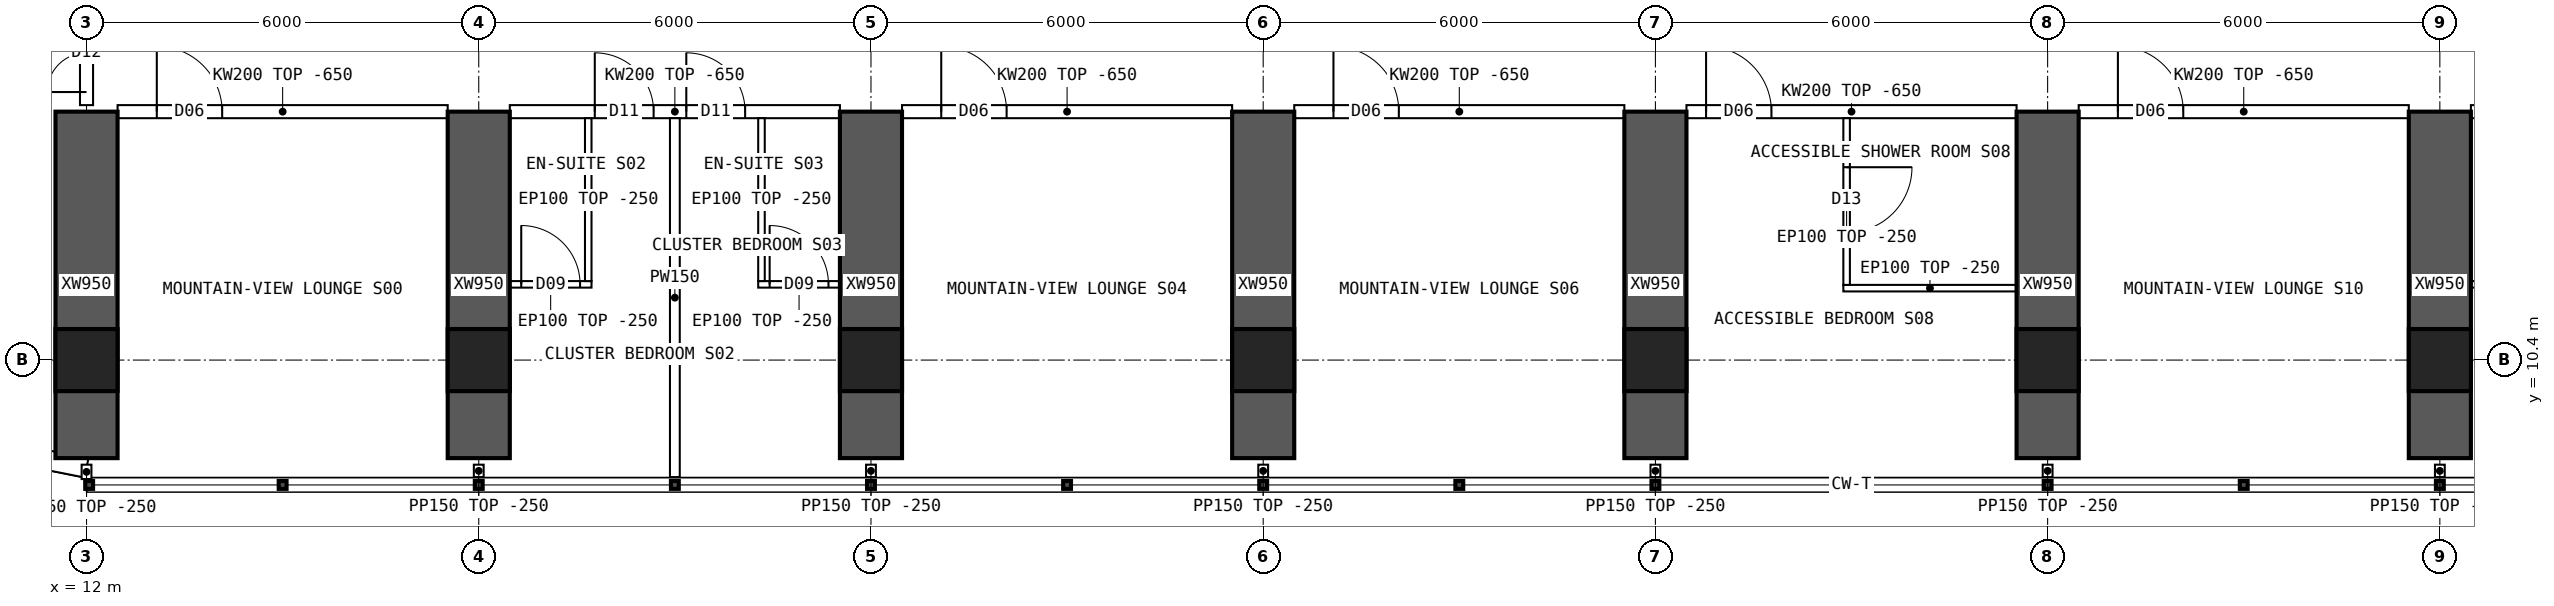
"""IFC4 building model, lengths in metres.
Left out: names, types, materials, properties, quantities, classifications, styles, units other than length and angle.
Written with IfcOpenShell. Run it as: python <this file> out.ifc"""

import sys

from ifc_helpers import new_model, si_unit, direction, frame, frame_2d, origin, origin_2d, place, context, subcontext, project, spatial, polyline, rectangle, hollow_rectangle, outline, extrude, element, fill, save


model = new_model("IFC4")
c1 = context("Model", 3, precision=1e-05, world=origin(), true_north=direction((0.0, 1.0)))
c2 = subcontext(c1, "Body", "Model", "MODEL_VIEW")
j1 = project(units=[si_unit("LENGTHUNIT", "METRE"), si_unit("PLANEANGLEUNIT", "RADIAN")], contexts=[c1])
p1 = place(None, origin())
s1 = spatial("IfcSite", under=j1, at=p1, CompositionType="ELEMENT")
p2 = place(p1, origin())
s2 = spatial("IfcBuilding", under=s1, at=p2, CompositionType="ELEMENT")
p3 = place(p2, frame((0.0, 0.0, 125.65)))
s3 = spatial("IfcBuildingStorey", under=s2, at=p3, CompositionType="ELEMENT", Elevation=125.65)
for number, where, z_axis, x_axis in (
    (1, (12.0, 10.4, 0.0), (0.0, 0.0, 1.0), (1.0, 0.0, 0.0)),
    (2, (18.0, 10.4, 0.0), (0.0, 0.0, 1.0), (1.0, 0.0, 0.0)),
    (3, (24.0, 10.4, 0.0), (0.0, 0.0, 1.0), (1.0, 0.0, 0.0)),
    (4, (30.0, 10.4, 0.0), (0.0, 0.0, 1.0), (1.0, 0.0, 0.0)),
    (5, (36.0, 10.4, 0.0), (0.0, 0.0, 1.0), (1.0, 0.0, 0.0)),
    (6, (42.0, 10.4, 0.0), (0.0, 0.0, 1.0), (1.0, 0.0, 0.0)),
    (7, (48.0, 10.4, 0.0), (0.0, 0.0, 1.0), (1.0, 0.0, 0.0)),
):
    element("IfcColumn", number, at=place(p3, frame(where, z_axis=z_axis, x_axis=x_axis)), inside=s3, PredefinedType="COLUMN", context=c2, shape_type="SweptSolid", body=[
        extrude(hollow_rectangle(XDim=0.95, YDim=0.95, WallThickness=0.095, at=origin_2d()), origin(), (0.0, 0.0, 1.0), 3.75),
    ])
for number, where, z_axis, x_axis in (
    (8, (12.0, 8.9, 0.0), (0.0, 0.0, 1.0), (0.0, 1.0, 0.0)),
    (9, (18.0, 8.9, 0.0), (0.0, 0.0, 1.0), (0.0, 1.0, 0.0)),
    (10, (24.0, 8.9, 0.0), (0.0, 0.0, 1.0), (0.0, 1.0, 0.0)),
    (11, (30.0, 8.9, 0.0), (0.0, 0.0, 1.0), (0.0, 1.0, 0.0)),
    (12, (36.0, 8.9, 0.0), (0.0, 0.0, 1.0), (0.0, 1.0, 0.0)),
    (13, (42.0, 8.9, 0.0), (0.0, 0.0, 1.0), (0.0, 1.0, 0.0)),
    (14, (48.0, 8.9, 0.0), (0.0, 0.0, 1.0), (0.0, 1.0, 0.0)),
):
    element("IfcWall", number, at=place(p3, frame(where, z_axis=z_axis, x_axis=x_axis)), inside=s3, PredefinedType="SHEAR", context=c2, shape_type="SweptSolid", body=[
        extrude(rectangle(XDim=5.3, YDim=0.95, at=frame_2d((2.65, 0.0))), origin(), (0.0, 0.0, 1.0), 3.75),
    ])
p4 = place(p3, frame((8.843, 9.378, 0.0), z_axis=(0.0, 0.0, 1.0), x_axis=(0.980787251524, -0.195080412259, 0.0)))
e15 = element("IfcWall", 15, at=p4, inside=s3, PredefinedType="SOLIDWALL", context=c2, shape_type="SweptSolid", body=[
    extrude(outline(polyline([(-0.03, -0.15), (3.249, -0.15), (3.189, 0.15), (0.03, 0.15), (-0.03, -0.15)])), origin(), (0.0, 0.0, 1.0), 3.5),
])
p5 = place(p4, frame((0.909, 0.0, 0.9)))
e16 = element("IfcOpeningElement", 16, at=p5, cuts=e15, PredefinedType="OPENING", context=c2, shape_type="SweptSolid", body=[
    extrude(rectangle(XDim=1.4, YDim=1.8, at=frame_2d((0.7, 0.9))), frame((0.0, 0.16, 0.0), z_axis=(0.0, -1.0, 0.0), x_axis=(1.0, 0.0, 0.0)), (0.0, 0.0, 1.0), 0.32),
])
p6 = place(p3, frame((12.475, 14.2, 0.0), z_axis=(0.0, 0.0, 1.0), x_axis=(1.0, 0.0, 0.0)))
e17 = element("IfcWall", 17, at=p6, inside=s3, PredefinedType="SOLIDWALL", context=c2, shape_type="SweptSolid", body=[
    extrude(outline(polyline([(0.0, 0.0), (5.05, 0.0), (5.05, 3.1), (0.0, 3.1), (0.0, 0.0)])), frame((0.0, 0.1, 0.0), z_axis=(0.0, -1.0, 0.0), x_axis=(1.0, 0.0, 0.0)), (0.0, 0.0, 1.0), 0.2),
])
p7 = place(p6, frame((0.6, 0.0, 0.0)))
e18 = element("IfcOpeningElement", 18, at=p7, cuts=e17, PredefinedType="OPENING", context=c2, shape_type="SweptSolid", body=[
    extrude(rectangle(XDim=1.0, YDim=2.1, at=frame_2d((0.5, 1.05))), frame((0.0, 0.11, 0.0), z_axis=(0.0, -1.0, 0.0), x_axis=(1.0, 0.0, 0.0)), (0.0, 0.0, 1.0), 0.22),
])
p8 = place(p3, frame((18.475, 14.2, 0.0), z_axis=(0.0, 0.0, 1.0), x_axis=(1.0, 0.0, 0.0)))
e19 = element("IfcWall", 19, at=p8, inside=s3, PredefinedType="SOLIDWALL", context=c2, shape_type="SweptSolid", body=[
    extrude(outline(polyline([(0.0, 0.0), (5.05, 0.0), (5.05, 3.1), (0.0, 3.1), (0.0, 0.0)])), frame((0.0, 0.1, 0.0), z_axis=(0.0, -1.0, 0.0), x_axis=(1.0, 0.0, 0.0)), (0.0, 0.0, 1.0), 0.2),
])
p9 = place(p8, frame((1.3, 0.0, 0.0)))
e20 = element("IfcOpeningElement", 20, at=p9, cuts=e19, PredefinedType="OPENING", context=c2, shape_type="SweptSolid", body=[
    extrude(rectangle(XDim=0.9, YDim=2.1, at=frame_2d((0.45, 1.05))), frame((0.0, 0.11, 0.0), z_axis=(0.0, -1.0, 0.0), x_axis=(1.0, 0.0, 0.0)), (0.0, 0.0, 1.0), 0.22),
])
p10 = place(p8, frame((2.7, 0.0, 0.0)))
e21 = element("IfcOpeningElement", 21, at=p10, cuts=e19, PredefinedType="OPENING", context=c2, shape_type="SweptSolid", body=[
    extrude(rectangle(XDim=0.9, YDim=2.1, at=frame_2d((0.45, 1.05))), frame((0.0, 0.11, 0.0), z_axis=(0.0, -1.0, 0.0), x_axis=(1.0, 0.0, 0.0)), (0.0, 0.0, 1.0), 0.22),
])
p11 = place(p3, frame((24.475, 14.2, 0.0), z_axis=(0.0, 0.0, 1.0), x_axis=(1.0, 0.0, 0.0)))
e22 = element("IfcWall", 22, at=p11, inside=s3, PredefinedType="SOLIDWALL", context=c2, shape_type="SweptSolid", body=[
    extrude(outline(polyline([(0.0, 0.0), (5.05, 0.0), (5.05, 3.1), (0.0, 3.1), (0.0, 0.0)])), frame((0.0, 0.1, 0.0), z_axis=(0.0, -1.0, 0.0), x_axis=(1.0, 0.0, 0.0)), (0.0, 0.0, 1.0), 0.2),
])
p12 = place(p11, frame((0.6, 0.0, 0.0)))
e23 = element("IfcOpeningElement", 23, at=p12, cuts=e22, PredefinedType="OPENING", context=c2, shape_type="SweptSolid", body=[
    extrude(rectangle(XDim=1.0, YDim=2.1, at=frame_2d((0.5, 1.05))), frame((0.0, 0.11, 0.0), z_axis=(0.0, -1.0, 0.0), x_axis=(1.0, 0.0, 0.0)), (0.0, 0.0, 1.0), 0.22),
])
p13 = place(p3, frame((30.475, 14.2, 0.0), z_axis=(0.0, 0.0, 1.0), x_axis=(1.0, 0.0, 0.0)))
e24 = element("IfcWall", 24, at=p13, inside=s3, PredefinedType="SOLIDWALL", context=c2, shape_type="SweptSolid", body=[
    extrude(outline(polyline([(0.0, 0.0), (5.05, 0.0), (5.05, 3.1), (0.0, 3.1), (0.0, 0.0)])), frame((0.0, 0.1, 0.0), z_axis=(0.0, -1.0, 0.0), x_axis=(1.0, 0.0, 0.0)), (0.0, 0.0, 1.0), 0.2),
])
p14 = place(p13, frame((0.6, 0.0, 0.0)))
e25 = element("IfcOpeningElement", 25, at=p14, cuts=e24, PredefinedType="OPENING", context=c2, shape_type="SweptSolid", body=[
    extrude(rectangle(XDim=1.0, YDim=2.1, at=frame_2d((0.5, 1.05))), frame((0.0, 0.11, 0.0), z_axis=(0.0, -1.0, 0.0), x_axis=(1.0, 0.0, 0.0)), (0.0, 0.0, 1.0), 0.22),
])
p15 = place(p3, frame((36.475, 14.2, 0.0), z_axis=(0.0, 0.0, 1.0), x_axis=(1.0, 0.0, 0.0)))
e26 = element("IfcWall", 26, at=p15, inside=s3, PredefinedType="SOLIDWALL", context=c2, shape_type="SweptSolid", body=[
    extrude(outline(polyline([(0.0, 0.0), (5.05, 0.0), (5.05, 3.1), (0.0, 3.1), (0.0, 0.0)])), frame((0.0, 0.1, 0.0), z_axis=(0.0, -1.0, 0.0), x_axis=(1.0, 0.0, 0.0)), (0.0, 0.0, 1.0), 0.2),
])
p16 = place(p15, frame((0.3, 0.0, 0.0)))
e27 = element("IfcOpeningElement", 27, at=p16, cuts=e26, PredefinedType="OPENING", context=c2, shape_type="SweptSolid", body=[
    extrude(rectangle(XDim=1.0, YDim=2.1, at=frame_2d((0.5, 1.05))), frame((0.0, 0.11, 0.0), z_axis=(0.0, -1.0, 0.0), x_axis=(1.0, 0.0, 0.0)), (0.0, 0.0, 1.0), 0.22),
])
p17 = place(p3, frame((42.475, 14.2, 0.0), z_axis=(0.0, 0.0, 1.0), x_axis=(1.0, 0.0, 0.0)))
e28 = element("IfcWall", 28, at=p17, inside=s3, PredefinedType="SOLIDWALL", context=c2, shape_type="SweptSolid", body=[
    extrude(outline(polyline([(0.0, 0.0), (5.05, 0.0), (5.05, 3.1), (0.0, 3.1), (0.0, 0.0)])), frame((0.0, 0.1, 0.0), z_axis=(0.0, -1.0, 0.0), x_axis=(1.0, 0.0, 0.0)), (0.0, 0.0, 1.0), 0.2),
])
p18 = place(p17, frame((0.6, 0.0, 0.0)))
e29 = element("IfcOpeningElement", 29, at=p18, cuts=e28, PredefinedType="OPENING", context=c2, shape_type="SweptSolid", body=[
    extrude(rectangle(XDim=1.0, YDim=2.1, at=frame_2d((0.5, 1.05))), frame((0.0, 0.11, 0.0), z_axis=(0.0, -1.0, 0.0), x_axis=(1.0, 0.0, 0.0)), (0.0, 0.0, 1.0), 0.22),
])
p19 = place(p3, frame((48.475, 14.2, 0.0), z_axis=(0.0, 0.0, 1.0), x_axis=(1.0, 0.0, 0.0)))
e30 = element("IfcWall", 30, at=p19, inside=s3, PredefinedType="SOLIDWALL", context=c2, shape_type="SweptSolid", body=[
    extrude(outline(polyline([(0.0, 0.0), (5.05, 0.0), (5.05, 3.1), (0.0, 3.1), (0.0, 0.0)])), frame((0.0, 0.1, 0.0), z_axis=(0.0, -1.0, 0.0), x_axis=(1.0, 0.0, 0.0)), (0.0, 0.0, 1.0), 0.2),
])
p20 = place(p19, frame((1.3, 0.0, 0.0)))
e31 = element("IfcOpeningElement", 31, at=p20, cuts=e30, PredefinedType="OPENING", context=c2, shape_type="SweptSolid", body=[
    extrude(rectangle(XDim=0.9, YDim=2.1, at=frame_2d((0.45, 1.05))), frame((0.0, 0.11, 0.0), z_axis=(0.0, -1.0, 0.0), x_axis=(1.0, 0.0, 0.0)), (0.0, 0.0, 1.0), 0.22),
])
p21 = place(p19, frame((2.7, 0.0, 0.0)))
e32 = element("IfcOpeningElement", 32, at=p21, cuts=e30, PredefinedType="OPENING", context=c2, shape_type="SweptSolid", body=[
    extrude(rectangle(XDim=0.9, YDim=2.1, at=frame_2d((0.45, 1.05))), frame((0.0, 0.11, 0.0), z_axis=(0.0, -1.0, 0.0), x_axis=(1.0, 0.0, 0.0)), (0.0, 0.0, 1.0), 0.22),
])
p22 = place(p3, frame((21.0, 8.61, 0.0), z_axis=(0.0, 0.0, 1.0), x_axis=(0.0, 1.0, 0.0)))
e33 = element("IfcWall", 33, at=p22, inside=s3, PredefinedType="PARTITIONING", context=c2, shape_type="SweptSolid", body=[
    extrude(outline(polyline([(0.0, 0.0), (5.49, 0.0), (5.49, 3.1), (5.442, 3.1), (5.44, 3.5), (1.992, 3.5), (1.99, 3.1), (1.592, 3.1), (1.59, 3.5), (0.0, 3.5), (0.0, 0.0)])), frame((0.0, 0.075, 0.0), z_axis=(0.0, -1.0, 0.0), x_axis=(1.0, 0.0, 0.0)), (0.0, 0.0, 1.0), 0.15),
])
p23 = place(p3, frame((19.725, 11.558, 0.0), z_axis=(0.0, 0.0, 1.0), x_axis=(-1.0, 0.0, 0.0)))
e34 = element("IfcWall", 34, at=p23, inside=s3, PredefinedType="PARTITIONING", context=c2, shape_type="SweptSolid", body=[
    extrude(rectangle(XDim=1.25, YDim=0.1, at=frame_2d((0.625, 0.0))), origin(), (0.0, 0.0, 1.0), 3.5),
])
p24 = place(p23, frame((0.175, 0.0, 0.0)))
e35 = element("IfcOpeningElement", 35, at=p24, cuts=e34, PredefinedType="OPENING", context=c2, shape_type="SweptSolid", body=[
    extrude(rectangle(XDim=0.9, YDim=2.1, at=frame_2d((0.45, 1.05))), frame((0.0, 0.06, 0.0), z_axis=(0.0, -1.0, 0.0), x_axis=(1.0, 0.0, 0.0)), (0.0, 0.0, 1.0), 0.12),
])
p25 = place(p3, frame((19.675, 11.608, 0.0), z_axis=(0.0, 0.0, 1.0), x_axis=(0.0, 1.0, 0.0)))
e36 = element("IfcWall", 36, at=p25, inside=s3, PredefinedType="PARTITIONING", context=c2, shape_type="SweptSolid", body=[
    extrude(outline(polyline([(0.0, 0.0), (2.492, 0.0), (2.492, 3.1), (2.444, 3.1), (2.442, 3.5), (0.0, 3.5), (0.0, 0.0)])), frame((0.0, 0.05, 0.0), z_axis=(0.0, -1.0, 0.0), x_axis=(1.0, 0.0, 0.0)), (0.0, 0.0, 1.0), 0.1),
])
p26 = place(p3, frame((23.525, 11.558, 0.0), z_axis=(0.0, 0.0, 1.0), x_axis=(-1.0, 0.0, 0.0)))
e37 = element("IfcWall", 37, at=p26, inside=s3, PredefinedType="PARTITIONING", context=c2, shape_type="SweptSolid", body=[
    extrude(rectangle(XDim=1.25, YDim=0.1, at=frame_2d((0.625, 0.0))), origin(), (0.0, 0.0, 1.0), 3.5),
])
p27 = place(p26, frame((0.175, 0.0, 0.0)))
e38 = element("IfcOpeningElement", 38, at=p27, cuts=e37, PredefinedType="OPENING", context=c2, shape_type="SweptSolid", body=[
    extrude(rectangle(XDim=0.9, YDim=2.1, at=frame_2d((0.45, 1.05))), frame((0.0, 0.06, 0.0), z_axis=(0.0, -1.0, 0.0), x_axis=(1.0, 0.0, 0.0)), (0.0, 0.0, 1.0), 0.12),
])
p28 = place(p3, frame((22.325, 11.608, 0.0), z_axis=(0.0, 0.0, 1.0), x_axis=(0.0, 1.0, 0.0)))
e39 = element("IfcWall", 39, at=p28, inside=s3, PredefinedType="PARTITIONING", context=c2, shape_type="SweptSolid", body=[
    extrude(outline(polyline([(0.0, 0.0), (2.492, 0.0), (2.492, 3.1), (2.444, 3.1), (2.442, 3.5), (0.0, 3.5), (0.0, 0.0)])), frame((0.0, 0.05, 0.0), z_axis=(0.0, -1.0, 0.0), x_axis=(1.0, 0.0, 0.0)), (0.0, 0.0, 1.0), 0.1),
])
p29 = place(p3, frame((38.875, 11.5, 0.0), z_axis=(0.0, 0.0, 1.0), x_axis=(1.0, 0.0, 0.0)))
e40 = element("IfcWall", 40, at=p29, inside=s3, PredefinedType="PARTITIONING", context=c2, shape_type="SweptSolid", body=[
    extrude(rectangle(XDim=2.65, YDim=0.1, at=frame_2d((1.325, 0.0))), origin(), (0.0, 0.0, 1.0), 3.5),
])
p30 = place(p3, frame((38.925, 11.55, 0.0), z_axis=(0.0, 0.0, 1.0), x_axis=(0.0, 1.0, 0.0)))
e41 = element("IfcWall", 41, at=p30, inside=s3, PredefinedType="PARTITIONING", context=c2, shape_type="SweptSolid", body=[
    extrude(outline(polyline([(0.0, 0.0), (2.55, 0.0), (2.55, 3.1), (2.502, 3.1), (2.5, 3.5), (0.0, 3.5), (0.0, 0.0)])), frame((0.0, 0.05, 0.0), z_axis=(0.0, -1.0, 0.0), x_axis=(1.0, 0.0, 0.0)), (0.0, 0.0, 1.0), 0.1),
])
p31 = place(p30, frame((0.8, 0.0, 0.0)))
e42 = element("IfcOpeningElement", 42, at=p31, cuts=e41, PredefinedType="OPENING", context=c2, shape_type="SweptSolid", body=[
    extrude(rectangle(XDim=1.0, YDim=2.1, at=frame_2d((0.5, 1.05))), frame((0.0, 0.06, 0.0), z_axis=(0.0, -1.0, 0.0), x_axis=(1.0, 0.0, 0.0)), (0.0, 0.0, 1.0), 0.12),
])
p32 = place(p3, frame((49.725, 11.558, 0.0), z_axis=(0.0, 0.0, 1.0), x_axis=(-1.0, 0.0, 0.0)))
e43 = element("IfcWall", 43, at=p32, inside=s3, PredefinedType="PARTITIONING", context=c2, shape_type="SweptSolid", body=[
    extrude(rectangle(XDim=1.25, YDim=0.1, at=frame_2d((0.625, 0.0))), origin(), (0.0, 0.0, 1.0), 3.5),
])
p33 = place(p32, frame((0.175, 0.0, 0.0)))
e44 = element("IfcOpeningElement", 44, at=p33, cuts=e43, PredefinedType="OPENING", context=c2, shape_type="SweptSolid", body=[
    extrude(rectangle(XDim=0.9, YDim=2.1, at=frame_2d((0.45, 1.05))), frame((0.0, 0.06, 0.0), z_axis=(0.0, -1.0, 0.0), x_axis=(1.0, 0.0, 0.0)), (0.0, 0.0, 1.0), 0.12),
])
p34 = place(p3, frame((12.0, 14.3, 0.0), z_axis=(0.0, 0.0, 1.0), x_axis=(0.0, 1.0, 0.0)))
e45 = element("IfcWall", 45, at=p34, inside=s3, PredefinedType="SOLIDWALL", context=c2, shape_type="SweptSolid", body=[
    extrude(outline(polyline([(0.0, 0.0), (1.6, 0.0), (1.6, 3.1), (0.0, 3.1), (0.0, 0.0)])), frame((0.0, 0.1, 0.0), z_axis=(0.0, -1.0, 0.0), x_axis=(1.0, 0.0, 0.0)), (0.0, 0.0, 1.0), 0.2),
])
p35 = place(p34, frame((0.2, 0.0, 0.0)))
e46 = element("IfcOpeningElement", 46, at=p35, cuts=e45, PredefinedType="OPENING", context=c2, shape_type="SweptSolid", body=[
    extrude(rectangle(XDim=1.2, YDim=2.1, at=frame_2d((0.6, 1.05))), frame((0.0, 0.11, 0.0), z_axis=(0.0, -1.0, 0.0), x_axis=(1.0, 0.0, 0.0)), (0.0, 0.0, 1.0), 0.22),
])
p36 = place(p3, frame((12.0, 8.8, 0.0), z_axis=(0.0, 0.0, 1.0), x_axis=(0.0, -1.0, 0.0)))
e47 = element("IfcWall", 47, at=p36, inside=s3, PredefinedType="PARTITIONING", context=c2, shape_type="SweptSolid", body=[
    extrude(rectangle(XDim=0.22, YDim=0.15, at=frame_2d((0.11, 0.0))), origin(), (0.0, 0.0, 1.0), 3.5),
])
for number, where, z_axis, x_axis in (
    (48, (18.0, 8.8, 0.0), (0.0, 0.0, 1.0), (0.0, -1.0, 0.0)),
    (49, (24.0, 8.8, 0.0), (0.0, 0.0, 1.0), (0.0, -1.0, 0.0)),
    (50, (30.0, 8.8, 0.0), (0.0, 0.0, 1.0), (0.0, -1.0, 0.0)),
    (51, (36.0, 8.8, 0.0), (0.0, 0.0, 1.0), (0.0, -1.0, 0.0)),
    (52, (42.0, 8.8, 0.0), (0.0, 0.0, 1.0), (0.0, -1.0, 0.0)),
    (53, (48.0, 8.8, 0.0), (0.0, 0.0, 1.0), (0.0, -1.0, 0.0)),
):
    element("IfcWall", number, at=place(p3, frame(where, z_axis=z_axis, x_axis=x_axis)), inside=s3, PredefinedType="PARTITIONING", context=c2, shape_type="SweptSolid", body=[
        extrude(rectangle(XDim=0.19, YDim=0.15, at=frame_2d((0.095, 0.0))), origin(), (0.0, 0.0, 1.0), 3.5),
    ])
p37 = place(p7, origin())
e54 = element("IfcDoor", 54, at=p37, inside=s3, OperationType="SINGLE_SWING_LEFT", PredefinedType="DOOR", context=c2, shape_type="SweptSolid", body=[
    extrude(rectangle(XDim=1.0, YDim=2.1, at=frame_2d((0.5, 1.05))), frame((0.0, 0.025, 0.0), z_axis=(0.0, -1.0, 0.0), x_axis=(1.0, 0.0, 0.0)), (0.0, 0.0, 1.0), 0.05),
])
fill(e18, e54)
p38 = place(p24, origin())
e55 = element("IfcDoor", 55, at=p38, inside=s3, OperationType="SINGLE_SWING_RIGHT", PredefinedType="DOOR", context=c2, shape_type="SweptSolid", body=[
    extrude(rectangle(XDim=0.9, YDim=2.1, at=frame_2d((0.45, 1.05))), frame((0.0, 0.025, 0.0), z_axis=(0.0, -1.0, 0.0), x_axis=(1.0, 0.0, 0.0)), (0.0, 0.0, 1.0), 0.05),
])
fill(e35, e55)
p39 = place(p9, origin())
e56 = element("IfcDoor", 56, at=p39, inside=s3, OperationType="SINGLE_SWING_LEFT", PredefinedType="DOOR", context=c2, shape_type="SweptSolid", body=[
    extrude(rectangle(XDim=0.9, YDim=2.1, at=frame_2d((0.45, 1.05))), frame((0.0, 0.025, 0.0), z_axis=(0.0, -1.0, 0.0), x_axis=(1.0, 0.0, 0.0)), (0.0, 0.0, 1.0), 0.05),
])
fill(e20, e56)
p40 = place(p27, origin())
e57 = element("IfcDoor", 57, at=p40, inside=s3, OperationType="SINGLE_SWING_RIGHT", PredefinedType="DOOR", context=c2, shape_type="SweptSolid", body=[
    extrude(rectangle(XDim=0.9, YDim=2.1, at=frame_2d((0.45, 1.05))), frame((0.0, 0.025, 0.0), z_axis=(0.0, -1.0, 0.0), x_axis=(1.0, 0.0, 0.0)), (0.0, 0.0, 1.0), 0.05),
])
fill(e38, e57)
p41 = place(p10, origin())
e58 = element("IfcDoor", 58, at=p41, inside=s3, OperationType="SINGLE_SWING_LEFT", PredefinedType="DOOR", context=c2, shape_type="SweptSolid", body=[
    extrude(rectangle(XDim=0.9, YDim=2.1, at=frame_2d((0.45, 1.05))), frame((0.0, 0.025, 0.0), z_axis=(0.0, -1.0, 0.0), x_axis=(1.0, 0.0, 0.0)), (0.0, 0.0, 1.0), 0.05),
])
fill(e21, e58)
p42 = place(p12, origin())
e59 = element("IfcDoor", 59, at=p42, inside=s3, OperationType="SINGLE_SWING_LEFT", PredefinedType="DOOR", context=c2, shape_type="SweptSolid", body=[
    extrude(rectangle(XDim=1.0, YDim=2.1, at=frame_2d((0.5, 1.05))), frame((0.0, 0.025, 0.0), z_axis=(0.0, -1.0, 0.0), x_axis=(1.0, 0.0, 0.0)), (0.0, 0.0, 1.0), 0.05),
])
fill(e23, e59)
p43 = place(p14, origin())
e60 = element("IfcDoor", 60, at=p43, inside=s3, OperationType="SINGLE_SWING_LEFT", PredefinedType="DOOR", context=c2, shape_type="SweptSolid", body=[
    extrude(rectangle(XDim=1.0, YDim=2.1, at=frame_2d((0.5, 1.05))), frame((0.0, 0.025, 0.0), z_axis=(0.0, -1.0, 0.0), x_axis=(1.0, 0.0, 0.0)), (0.0, 0.0, 1.0), 0.05),
])
fill(e25, e60)
p44 = place(p31, origin())
e61 = element("IfcDoor", 61, at=p44, inside=s3, OperationType="SINGLE_SWING_RIGHT", PredefinedType="DOOR", context=c2, shape_type="SweptSolid", body=[
    extrude(rectangle(XDim=1.0, YDim=2.1, at=frame_2d((0.5, 1.05))), frame((0.0, 0.025, 0.0), z_axis=(0.0, -1.0, 0.0), x_axis=(1.0, 0.0, 0.0)), (0.0, 0.0, 1.0), 0.05),
])
fill(e42, e61)
p45 = place(p16, origin())
e62 = element("IfcDoor", 62, at=p45, inside=s3, OperationType="SINGLE_SWING_LEFT", PredefinedType="DOOR", context=c2, shape_type="SweptSolid", body=[
    extrude(rectangle(XDim=1.0, YDim=2.1, at=frame_2d((0.5, 1.05))), frame((0.0, 0.025, 0.0), z_axis=(0.0, -1.0, 0.0), x_axis=(1.0, 0.0, 0.0)), (0.0, 0.0, 1.0), 0.05),
])
fill(e27, e62)
p46 = place(p18, origin())
e63 = element("IfcDoor", 63, at=p46, inside=s3, OperationType="SINGLE_SWING_LEFT", PredefinedType="DOOR", context=c2, shape_type="SweptSolid", body=[
    extrude(rectangle(XDim=1.0, YDim=2.1, at=frame_2d((0.5, 1.05))), frame((0.0, 0.025, 0.0), z_axis=(0.0, -1.0, 0.0), x_axis=(1.0, 0.0, 0.0)), (0.0, 0.0, 1.0), 0.05),
])
fill(e29, e63)
p47 = place(p35, origin())
e64 = element("IfcDoor", 64, at=p47, inside=s3, OperationType="DOUBLE_DOOR_SINGLE_SWING", PredefinedType="DOOR", context=c2, shape_type="SweptSolid", body=[
    extrude(rectangle(XDim=1.2, YDim=2.1, at=frame_2d((0.6, 1.05))), frame((0.0, 0.025, 0.0), z_axis=(0.0, -1.0, 0.0), x_axis=(1.0, 0.0, 0.0)), (0.0, 0.0, 1.0), 0.05),
])
fill(e46, e64)
save(model, sys.argv[1])
